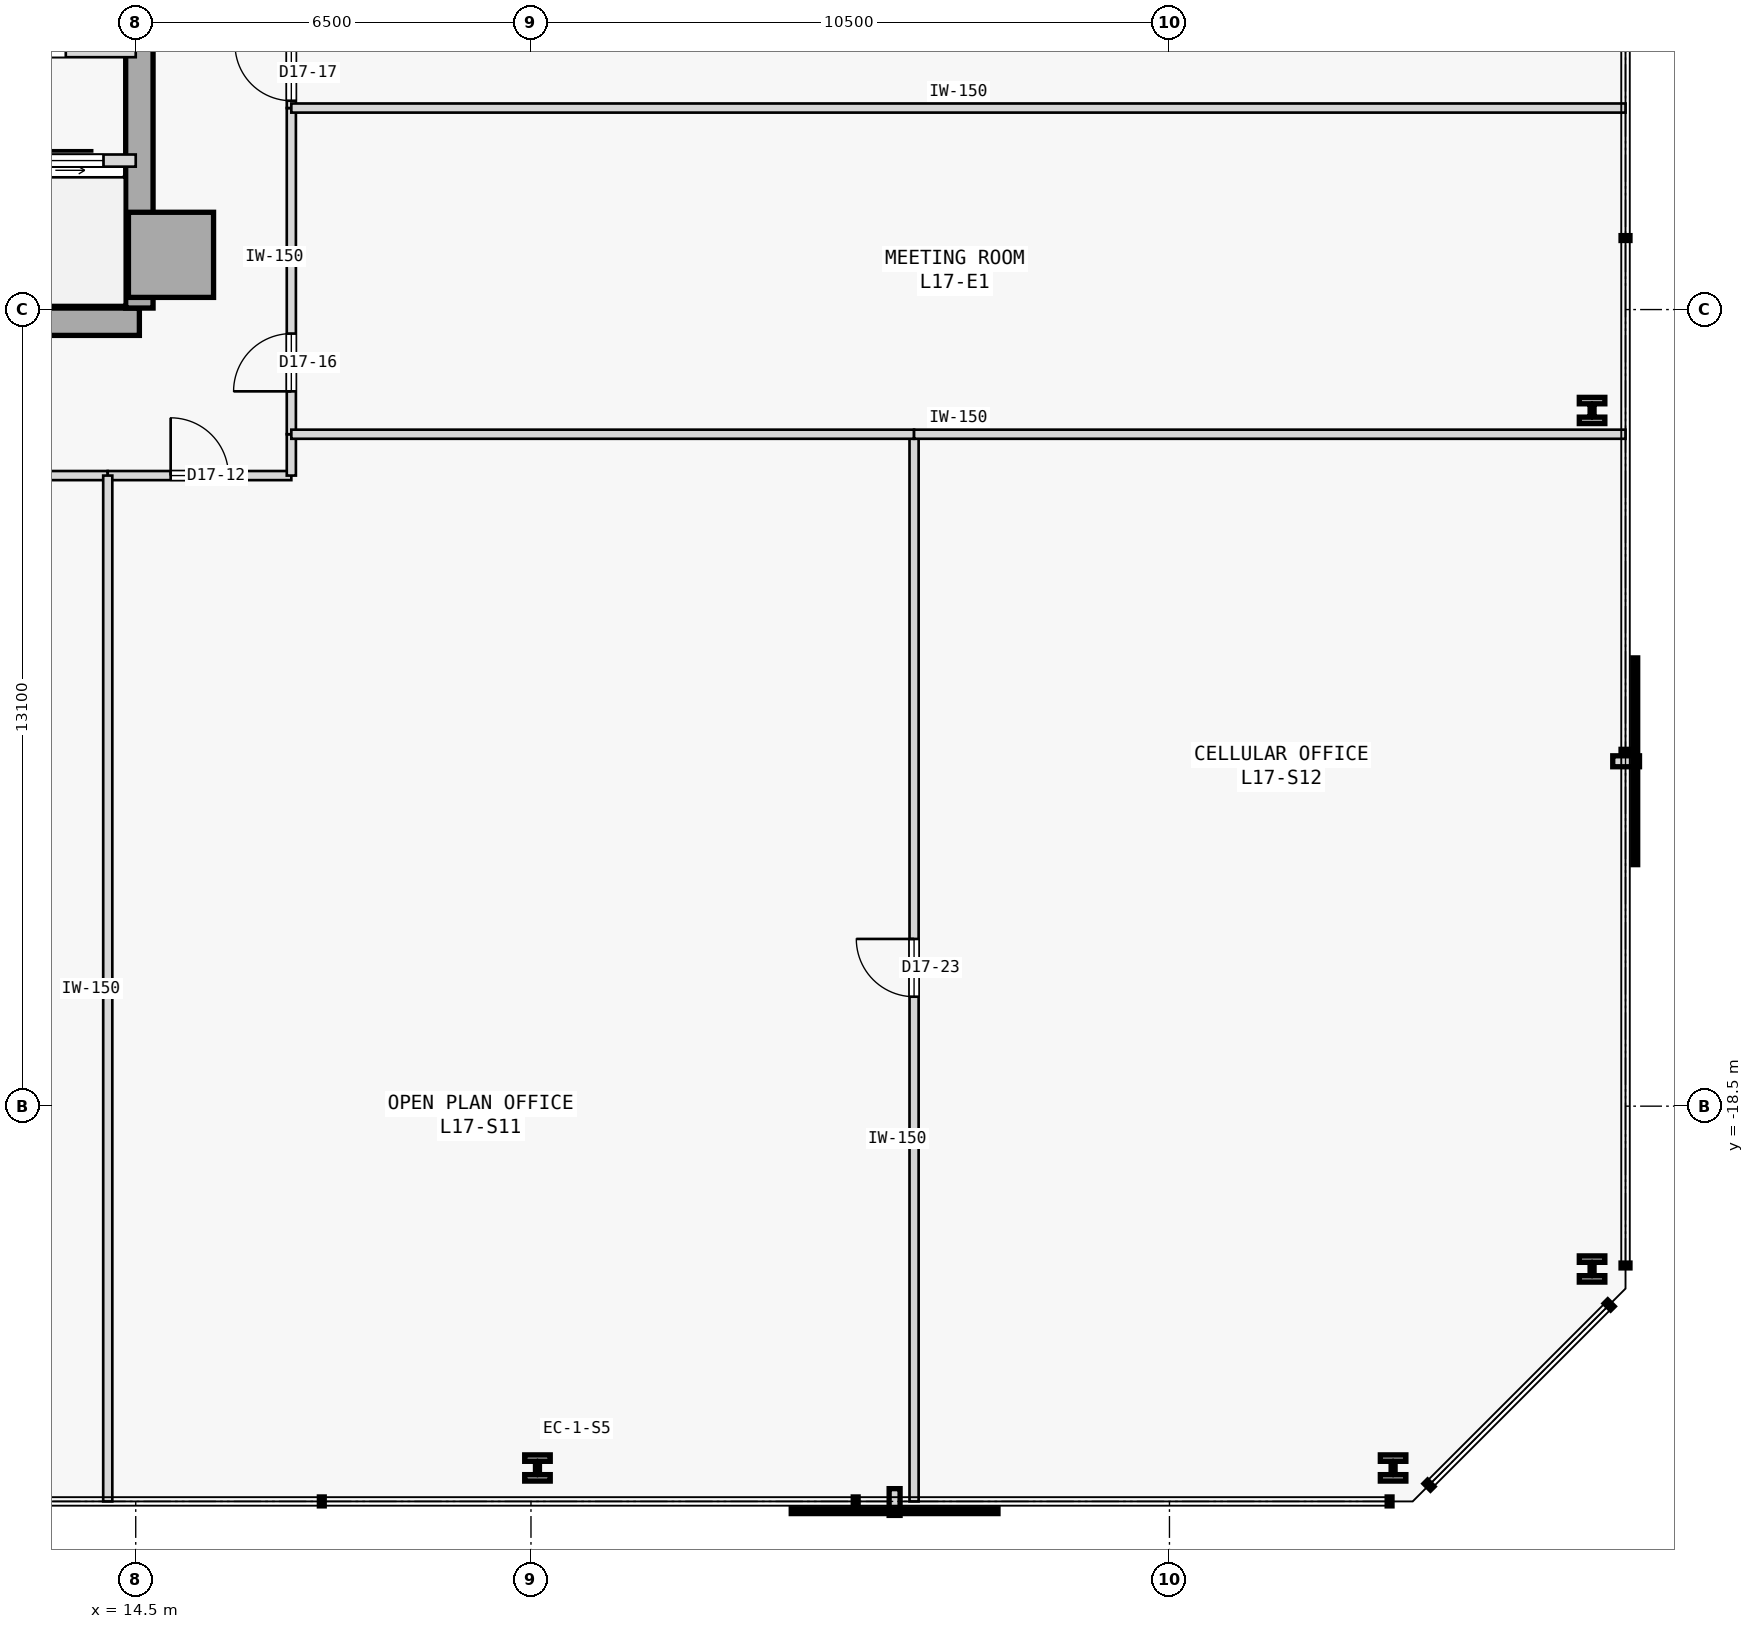
"""IFC4 building model, lengths in metres.
Left out: names, types, materials, properties, quantities, classifications, styles, units other than length and angle.
Written with IfcOpenShell. Run it as: python <this file> out.ifc"""

import sys

from ifc_helpers import new_model, si_unit, direction, frame, frame_2d, origin, origin_2d, place, context, subcontext, project, spatial, rectangle, i_section, extrude, element, fill, save


model = new_model("IFC4")
c1 = context("Model", 3, precision=1e-05, world=origin(), true_north=direction((0.0, 1.0)))
c2 = subcontext(c1, "Body", "Model", "MODEL_VIEW")
j1 = project(units=[si_unit("LENGTHUNIT", "METRE"), si_unit("PLANEANGLEUNIT", "RADIAN")], contexts=[c1])
p1 = place(None, origin())
s1 = spatial("IfcSite", under=j1, at=p1, CompositionType="ELEMENT")
p2 = place(p1, origin())
s2 = spatial("IfcBuilding", under=s1, at=p2, CompositionType="ELEMENT")
p3 = place(p2, frame((0.0, 0.0, 71.2)))
s3 = spatial("IfcBuildingStorey", under=s2, at=p3, CompositionType="ELEMENT", Elevation=71.2)
p4 = place(p3, frame((15.08, -4.5, 0.0), z_axis=(0.0, 0.0, 1.0), x_axis=(1.0, 0.0, 0.0)))
e1 = element("IfcColumn", 1, at=p4, inside=s3, PredefinedType="COLUMN", context=c2, shape_type="SweptSolid", body=[
    extrude(rectangle(XDim=1.4, YDim=1.4, at=origin_2d()), origin(), (0.0, 0.0, 1.0), 3.8),
])
p5 = place(p3, frame((3.7, -5.6, 0.0), z_axis=(0.0, 0.0, 1.0), x_axis=(1.0, 0.0, 0.0)))
e2 = element("IfcWall", 2, at=p5, inside=s3, PredefinedType="SHEAR", context=c2, shape_type="SweptSolid", body=[
    extrude(rectangle(XDim=10.86, YDim=0.45, at=frame_2d((5.43, 0.0))), origin(), (0.0, 0.0, 1.0), 3.575),
])
p6 = place(p3, frame((14.56, -5.375, 0.0), z_axis=(0.0, 0.0, 1.0), x_axis=(0.0, 1.0, 0.0)))
e3 = element("IfcWall", 3, at=p6, inside=s3, PredefinedType="SHEAR", context=c2, shape_type="SweptSolid", body=[
    extrude(rectangle(XDim=10.75, YDim=0.45, at=frame_2d((5.375, 0.0))), origin(), (0.0, 0.0, 1.0), 3.575),
])
for number, where, z_axis, x_axis in (
    (4, (21.107, -24.45, 0.0), (0.0, 0.0, 1.0), (1.0, 0.0, 0.0)),
    (5, (35.178, -24.45, 0.0), (0.0, 0.0, 1.0), (1.0, 0.0, 0.0)),
    (6, (38.45, -21.178, 0.0), (0.0, 0.0, 1.0), (1.0, 0.0, 0.0)),
    (7, (38.45, -7.059, 0.0), (0.0, 0.0, 1.0), (1.0, 0.0, 0.0)),
):
    element("IfcColumn", number, at=place(p3, frame(where, z_axis=z_axis, x_axis=x_axis)), inside=s3, PredefinedType="COLUMN", context=c2, shape_type="SweptSolid", body=[
        extrude(i_section(OverallWidth=0.42, OverallDepth=0.431, WebThickness=0.065, FlangeThickness=0.106, FilletRadius=0.015, at=origin_2d()), origin(), (0.0, 0.0, 1.0), 3.8),
    ])
p7 = place(p3, frame((11.55, -1.15, 0.0), z_axis=(0.0, 0.0, 1.0), x_axis=(1.0, 0.0, 0.0)))
e8 = element("IfcWall", 8, at=p7, inside=s3, PredefinedType="STANDARD", context=c2, shape_type="SweptSolid", body=[
    extrude(rectangle(XDim=2.95, YDim=0.2, at=frame_2d((1.475, 0.0))), origin(), (0.0, 0.0, 1.0), 3.575),
])
p8 = place(p7, frame((0.75, 0.0, 0.0)))
e9 = element("IfcOpeningElement", 9, at=p8, cuts=e8, PredefinedType="OPENING", context=c2, shape_type="SweptSolid", body=[
    extrude(rectangle(XDim=1.05, YDim=2.18, at=frame_2d((0.525, 1.09))), frame((0.0, 0.11, 0.0), z_axis=(0.0, -1.0, 0.0), x_axis=(1.0, 0.0, 0.0)), (0.0, 0.0, 1.0), 0.22),
])
p9 = place(p3, frame((3.7, -2.95, 0.0), z_axis=(0.0, 0.0, 1.0), x_axis=(1.0, 0.0, 0.0)))
e10 = element("IfcWall", 10, at=p9, inside=s3, PredefinedType="STANDARD", context=c2, shape_type="SweptSolid", body=[
    extrude(rectangle(XDim=10.8, YDim=0.2, at=frame_2d((5.4, 0.0))), origin(), (0.0, 0.0, 1.0), 3.575),
])
p10 = place(p9, frame((7.01, 0.0, 0.0)))
e11 = element("IfcOpeningElement", 11, at=p10, cuts=e10, PredefinedType="OPENING", context=c2, shape_type="SweptSolid", body=[
    extrude(rectangle(XDim=1.1, YDim=2.15, at=frame_2d((0.55, 1.075))), frame((0.0, 0.11, 0.0), z_axis=(0.0, -1.0, 0.0), x_axis=(1.0, 0.0, 0.0)), (0.0, 0.0, 1.0), 0.22),
])
p11 = place(p9, frame((9.17, 0.0, 0.0)))
e12 = element("IfcOpeningElement", 12, at=p11, cuts=e10, PredefinedType="OPENING", context=c2, shape_type="SweptSolid", body=[
    extrude(rectangle(XDim=1.1, YDim=2.15, at=frame_2d((0.55, 1.075))), frame((0.0, 0.11, 0.0), z_axis=(0.0, -1.0, 0.0), x_axis=(1.0, 0.0, 0.0)), (0.0, 0.0, 1.0), 0.22),
])
p12 = place(p3, frame((0.92, -8.13, 0.0), z_axis=(0.0, 0.0, 1.0), x_axis=(1.0, 0.0, 0.0)))
e13 = element("IfcWall", 13, at=p12, inside=s3, PredefinedType="PARTITIONING", context=c2, shape_type="SweptSolid", body=[
    extrude(rectangle(XDim=13.12, YDim=0.15, at=frame_2d((6.56, 0.0))), origin(), (0.0, 0.0, 1.0), 3.575),
])
p13 = place(p3, frame((14.04, -8.13, 0.0), z_axis=(0.0, 0.0, 1.0), x_axis=(1.0, 0.0, 0.0)))
e14 = element("IfcWall", 14, at=p13, inside=s3, PredefinedType="PARTITIONING", context=c2, shape_type="SweptSolid", body=[
    extrude(rectangle(XDim=3.019, YDim=0.15, at=frame_2d((1.51, 0.0))), origin(), (0.0, 0.0, 1.0), 3.575),
])
p14 = place(p13, frame((1.034, 0.0, 0.0)))
e15 = element("IfcOpeningElement", 15, at=p14, cuts=e14, PredefinedType="OPENING", context=c2, shape_type="SweptSolid", body=[
    extrude(rectangle(XDim=0.95, YDim=2.15, at=frame_2d((0.475, 1.075))), frame((0.0, 0.085, 0.0), z_axis=(0.0, -1.0, 0.0), x_axis=(1.0, 0.0, 0.0)), (0.0, 0.0, 1.0), 0.17),
])
p15 = place(p3, frame((17.059, -8.13, 0.0), z_axis=(0.0, 0.0, 1.0), x_axis=(0.0, 1.0, 0.0)))
e16 = element("IfcWall", 16, at=p15, inside=s3, PredefinedType="PARTITIONING", context=c2, shape_type="SweptSolid", body=[
    extrude(rectangle(XDim=0.68, YDim=0.15, at=frame_2d((0.34, 0.0))), origin(), (0.0, 0.0, 1.0), 3.575),
])
p16 = place(p3, frame((17.059, -7.45, 0.0), z_axis=(0.0, 0.0, 1.0), x_axis=(0.0, 1.0, 0.0)))
e17 = element("IfcWall", 17, at=p16, inside=s3, PredefinedType="PARTITIONING", context=c2, shape_type="SweptSolid", body=[
    extrude(rectangle(XDim=5.364, YDim=0.15, at=frame_2d((2.682, 0.0))), origin(), (0.0, 0.0, 1.0), 3.575),
])
p17 = place(p16, frame((0.705, 0.0, 0.0)))
e18 = element("IfcOpeningElement", 18, at=p17, cuts=e17, PredefinedType="OPENING", context=c2, shape_type="SweptSolid", body=[
    extrude(rectangle(XDim=0.95, YDim=2.15, at=frame_2d((0.475, 1.075))), frame((0.0, 0.085, 0.0), z_axis=(0.0, -1.0, 0.0), x_axis=(1.0, 0.0, 0.0)), (0.0, 0.0, 1.0), 0.17),
])
p18 = place(p3, frame((17.059, -2.086, 0.0), z_axis=(0.0, 0.0, 1.0), x_axis=(0.0, 1.0, 0.0)))
e19 = element("IfcWall", 19, at=p18, inside=s3, PredefinedType="PARTITIONING", context=c2, shape_type="SweptSolid", body=[
    extrude(rectangle(XDim=1.166, YDim=0.15, at=frame_2d((0.583, 0.0))), origin(), (0.0, 0.0, 1.0), 3.575),
])
p19 = place(p18, frame((0.12, 0.0, 0.0)))
e20 = element("IfcOpeningElement", 20, at=p19, cuts=e19, PredefinedType="OPENING", context=c2, shape_type="SweptSolid", body=[
    extrude(rectangle(XDim=0.926, YDim=2.15, at=frame_2d((0.463, 1.075))), frame((0.0, 0.085, 0.0), z_axis=(0.0, -1.0, 0.0), x_axis=(1.0, 0.0, 0.0)), (0.0, 0.0, 1.0), 0.17),
])
p20 = place(p3, frame((14.04, -25.0, 0.0), z_axis=(0.0, 0.0, 1.0), x_axis=(0.0, 1.0, 0.0)))
e21 = element("IfcWall", 21, at=p20, inside=s3, PredefinedType="PARTITIONING", context=c2, shape_type="SweptSolid", body=[
    extrude(rectangle(XDim=16.87, YDim=0.15, at=frame_2d((8.435, 0.0))), origin(), (0.0, 0.0, 1.0), 3.575),
])
p21 = place(p3, frame((27.3, -25.0, 0.0), z_axis=(0.0, 0.0, 1.0), x_axis=(0.0, 1.0, 0.0)))
e22 = element("IfcWall", 22, at=p21, inside=s3, PredefinedType="PARTITIONING", context=c2, shape_type="SweptSolid", body=[
    extrude(rectangle(XDim=17.55, YDim=0.15, at=frame_2d((8.775, 0.0))), origin(), (0.0, 0.0, 1.0), 3.575),
])
p22 = place(p21, frame((8.3, 0.0, 0.0)))
e23 = element("IfcOpeningElement", 23, at=p22, cuts=e22, PredefinedType="OPENING", context=c2, shape_type="SweptSolid", body=[
    extrude(rectangle(XDim=0.95, YDim=2.15, at=frame_2d((0.475, 1.075))), frame((0.0, 0.085, 0.0), z_axis=(0.0, -1.0, 0.0), x_axis=(1.0, 0.0, 0.0)), (0.0, 0.0, 1.0), 0.17),
])
p23 = place(p3, frame((17.059, -7.45, 0.0), z_axis=(0.0, 0.0, 1.0), x_axis=(1.0, 0.0, 0.0)))
e24 = element("IfcWall", 24, at=p23, inside=s3, PredefinedType="PARTITIONING", context=c2, shape_type="SweptSolid", body=[
    extrude(rectangle(XDim=10.241, YDim=0.15, at=frame_2d((5.121, 0.0))), origin(), (0.0, 0.0, 1.0), 3.575),
])
p24 = place(p3, frame((27.3, -7.45, 0.0), z_axis=(0.0, 0.0, 1.0), x_axis=(1.0, 0.0, 0.0)))
e25 = element("IfcWall", 25, at=p24, inside=s3, PredefinedType="PARTITIONING", context=c2, shape_type="SweptSolid", body=[
    extrude(rectangle(XDim=11.7, YDim=0.15, at=frame_2d((5.85, 0.0))), origin(), (0.0, 0.0, 1.0), 3.575),
])
p25 = place(p3, frame((17.059, -2.086, 0.0), z_axis=(0.0, 0.0, 1.0), x_axis=(1.0, 0.0, 0.0)))
e26 = element("IfcWall", 26, at=p25, inside=s3, PredefinedType="PARTITIONING", context=c2, shape_type="SweptSolid", body=[
    extrude(rectangle(XDim=21.941, YDim=0.15, at=frame_2d((10.97, 0.0))), origin(), (0.0, 0.0, 1.0), 3.575),
])
p26 = place(p8, origin())
e27 = element("IfcDoor", 27, at=p26, inside=s3, OperationType="SINGLE_SWING_LEFT", PredefinedType="DOOR", context=c2, shape_type="SweptSolid", body=[
    extrude(rectangle(XDim=1.05, YDim=2.18, at=frame_2d((0.525, 1.09))), frame((0.0, 0.025, 0.0), z_axis=(0.0, -1.0, 0.0), x_axis=(1.0, 0.0, 0.0)), (0.0, 0.0, 1.0), 0.05),
])
fill(e9, e27)
p27 = place(p11, origin())
e28 = element("IfcDoor", 28, at=p27, inside=s3, OperationType="SLIDING_TO_LEFT", PredefinedType="DOOR", context=c2, shape_type="SweptSolid", body=[
    extrude(rectangle(XDim=1.1, YDim=2.15, at=frame_2d((0.55, 1.075))), frame((0.0, 0.025, 0.0), z_axis=(0.0, -1.0, 0.0), x_axis=(1.0, 0.0, 0.0)), (0.0, 0.0, 1.0), 0.05),
])
fill(e12, e28)
p28 = place(p14, origin())
e29 = element("IfcDoor", 29, at=p28, inside=s3, OperationType="SINGLE_SWING_LEFT", PredefinedType="DOOR", context=c2, shape_type="SweptSolid", body=[
    extrude(rectangle(XDim=0.95, YDim=2.15, at=frame_2d((0.475, 1.075))), frame((0.0, 0.025, 0.0), z_axis=(0.0, -1.0, 0.0), x_axis=(1.0, 0.0, 0.0)), (0.0, 0.0, 1.0), 0.05),
])
fill(e15, e29)
p29 = place(p17, origin())
e30 = element("IfcDoor", 30, at=p29, inside=s3, OperationType="SINGLE_SWING_LEFT", PredefinedType="DOOR", context=c2, shape_type="SweptSolid", body=[
    extrude(rectangle(XDim=0.95, YDim=2.15, at=frame_2d((0.475, 1.075))), frame((0.0, 0.025, 0.0), z_axis=(0.0, -1.0, 0.0), x_axis=(1.0, 0.0, 0.0)), (0.0, 0.0, 1.0), 0.05),
])
fill(e18, e30)
p30 = place(p19, origin())
e31 = element("IfcDoor", 31, at=p30, inside=s3, OperationType="SINGLE_SWING_RIGHT", PredefinedType="DOOR", context=c2, shape_type="SweptSolid", body=[
    extrude(rectangle(XDim=0.926, YDim=2.15, at=frame_2d((0.463, 1.075))), frame((0.0, 0.025, 0.0), z_axis=(0.0, -1.0, 0.0), x_axis=(1.0, 0.0, 0.0)), (0.0, 0.0, 1.0), 0.05),
])
fill(e20, e31)
p31 = place(p22, origin())
e32 = element("IfcDoor", 32, at=p31, inside=s3, OperationType="SINGLE_SWING_RIGHT", PredefinedType="DOOR", context=c2, shape_type="SweptSolid", body=[
    extrude(rectangle(XDim=0.95, YDim=2.15, at=frame_2d((0.475, 1.075))), frame((0.0, 0.025, 0.0), z_axis=(0.0, -1.0, 0.0), x_axis=(1.0, 0.0, 0.0)), (0.0, 0.0, 1.0), 0.05),
])
fill(e23, e32)
save(model, sys.argv[1])
